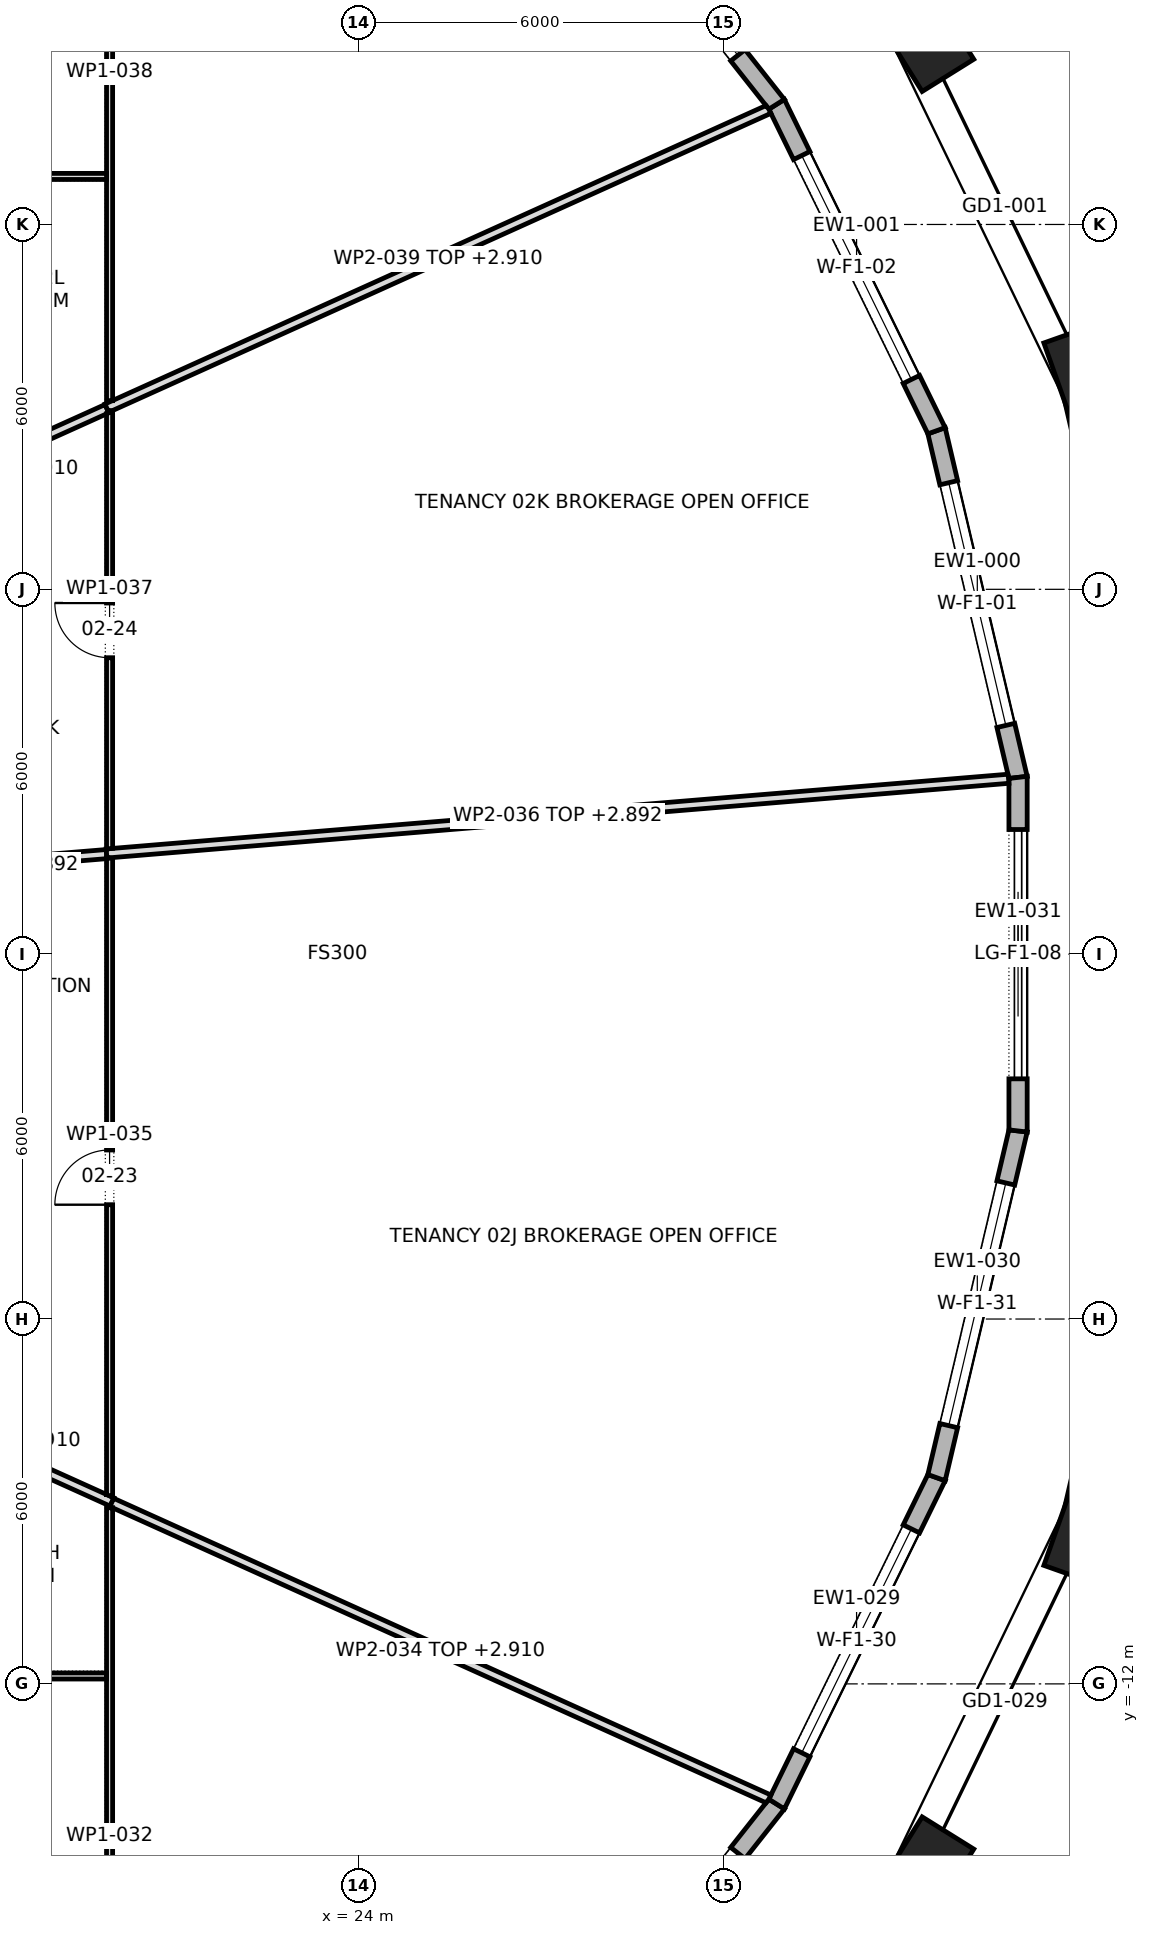
"""IFC4 building model, lengths in metres.
Left out: names, types, materials, properties, quantities, classifications, styles, units other than length and angle.
Written with IfcOpenShell. Run it as: python <this file> out.ifc"""

import sys

from ifc_helpers import new_model, si_unit, direction, frame, frame_2d, origin, origin_2d, place, context, subcontext, project, spatial, polyline, rectangle, outline, extrude, element, fill, save


model = new_model("IFC4")
c1 = context("Model", 3, precision=1e-05, world=origin(), true_north=direction((0.0, 1.0)))
c2 = subcontext(c1, "Body", "Model", "MODEL_VIEW")
j1 = project(units=[si_unit("LENGTHUNIT", "METRE"), si_unit("PLANEANGLEUNIT", "RADIAN")], contexts=[c1])
p1 = place(None, origin())
s1 = spatial("IfcSite", under=j1, at=p1, CompositionType="ELEMENT")
p2 = place(p1, origin())
s2 = spatial("IfcBuilding", under=s1, at=p2, CompositionType="ELEMENT")
p3 = place(p2, frame((0.0, 0.0, 36.1)))
s3 = spatial("IfcBuildingStorey", under=s2, at=p3, CompositionType="ELEMENT", Elevation=36.1)
for number, where, z_axis, x_axis in (
    (1, (36.036, 9.37, 0.0), (0.0, 0.0, 1.0), (-0.334, 0.943, 0.0)),
    (2, (33.211, 15.216, 0.0), (0.0, 0.0, 1.0), (-0.529, 0.849, 0.0)),
    (3, (33.211, -15.216, 0.0), (0.0, 0.0, 1.0), (0.529, 0.849, 0.0)),
    (4, (36.036, -9.37, 0.0), (0.0, 0.0, 1.0), (0.334, 0.943, 0.0)),
):
    element("IfcColumn", number, at=place(p3, frame(where, z_axis=z_axis, x_axis=x_axis)), inside=s3, PredefinedType="COLUMN", context=c2, shape_type="SweptSolid", body=[
        extrude(rectangle(XDim=1.8, YDim=1.0, at=origin_2d()), origin(), (0.0, 0.0, 1.0), 4.2),
    ])
p4 = place(p3, frame((34.84, 2.907, 0.0), z_axis=(0.0, 0.0, 1.0), x_axis=(-0.228976600496, 0.97343192696, 0.0)))
e5 = element("IfcWall", 5, at=p4, inside=s3, PredefinedType="STANDARD", context=c2, shape_type="SweptSolid", body=[
    extrude(outline(polyline([(-0.017, -0.15), (5.874, -0.15), (5.84, 0.15), (0.017, 0.15), (-0.017, -0.15)])), origin(), (0.0, 0.0, 1.0), 3.9),
])
p5 = place(p4, frame((0.878, 0.0, 0.6)))
e6 = element("IfcOpeningElement", 6, at=p5, cuts=e5, PredefinedType="OPENING", context=c2, shape_type="SweptSolid", body=[
    extrude(rectangle(XDim=4.1, YDim=2.85, at=frame_2d((2.05, 1.425))), frame((0.0, 0.162, 0.0), z_axis=(0.0, -1.0, 0.0), x_axis=(1.0, 0.0, 0.0)), (0.0, 0.0, 1.0), 0.324),
])
p6 = place(p3, frame((33.499, 8.608, 0.0), z_axis=(0.0, 0.0, 1.0), x_axis=(-0.439896354052, 0.898048549741, 0.0)))
e7 = element("IfcWall", 7, at=p6, inside=s3, PredefinedType="STANDARD", context=c2, shape_type="SweptSolid", body=[
    extrude(outline(polyline([(-0.017, -0.15), (5.994, -0.15), (5.962, 0.15), (0.017, 0.15), (-0.017, -0.15)])), origin(), (0.0, 0.0, 1.0), 3.9),
])
p7 = place(p6, frame((0.939, 0.0, 0.6)))
e8 = element("IfcOpeningElement", 8, at=p7, cuts=e7, PredefinedType="OPENING", context=c2, shape_type="SweptSolid", body=[
    extrude(rectangle(XDim=4.1, YDim=2.85, at=frame_2d((2.05, 1.425))), frame((0.0, 0.162, 0.0), z_axis=(0.0, -1.0, 0.0), x_axis=(1.0, 0.0, 0.0)), (0.0, 0.0, 1.0), 0.324),
])
p8 = place(p3, frame((30.869, 13.976, 0.0), z_axis=(0.0, 0.0, 1.0), x_axis=(-0.61992334328, 0.784662378642, 0.0)))
e9 = element("IfcWall", 9, at=p8, inside=s3, PredefinedType="STANDARD", context=c2, shape_type="SweptSolid", body=[
    extrude(outline(polyline([(-0.016, -0.15), (6.17, -0.15), (6.14, 0.15), (0.016, 0.15), (-0.016, -0.15)])), origin(), (0.0, 0.0, 1.0), 3.9),
])
p9 = place(p8, frame((1.027, 0.0, 0.6)))
e10 = element("IfcOpeningElement", 10, at=p9, cuts=e9, PredefinedType="OPENING", context=c2, shape_type="SweptSolid", body=[
    extrude(rectangle(XDim=4.1, YDim=2.85, at=frame_2d((2.05, 1.425))), frame((0.0, 0.162, 0.0), z_axis=(0.0, -1.0, 0.0), x_axis=(1.0, 0.0, 0.0)), (0.0, 0.0, 1.0), 0.324),
])
p10 = place(p3, frame((27.054, -18.806, 0.0), z_axis=(0.0, 0.0, 1.0), x_axis=(0.61992334328, 0.784662378642, 0.0)))
e11 = element("IfcWall", 11, at=p10, inside=s3, PredefinedType="STANDARD", context=c2, shape_type="SweptSolid", body=[
    extrude(outline(polyline([(-0.015, -0.15), (6.171, -0.15), (6.139, 0.15), (0.015, 0.15), (-0.015, -0.15)])), origin(), (0.0, 0.0, 1.0), 3.9),
])
p11 = place(p10, frame((1.027, 0.0, 0.6)))
e12 = element("IfcOpeningElement", 12, at=p11, cuts=e11, PredefinedType="OPENING", context=c2, shape_type="SweptSolid", body=[
    extrude(rectangle(XDim=4.1, YDim=2.85, at=frame_2d((2.05, 1.425))), frame((0.0, 0.162, 0.0), z_axis=(0.0, -1.0, 0.0), x_axis=(1.0, 0.0, 0.0)), (0.0, 0.0, 1.0), 0.324),
])
p12 = place(p3, frame((30.869, -13.976, 0.0), z_axis=(0.0, 0.0, 1.0), x_axis=(0.439896354052, 0.898048549741, 0.0)))
e13 = element("IfcWall", 13, at=p12, inside=s3, PredefinedType="STANDARD", context=c2, shape_type="SweptSolid", body=[
    extrude(outline(polyline([(-0.016, -0.15), (5.995, -0.15), (5.961, 0.15), (0.016, 0.15), (-0.016, -0.15)])), origin(), (0.0, 0.0, 1.0), 3.9),
])
p13 = place(p12, frame((0.939, 0.0, 0.6)))
e14 = element("IfcOpeningElement", 14, at=p13, cuts=e13, PredefinedType="OPENING", context=c2, shape_type="SweptSolid", body=[
    extrude(rectangle(XDim=4.1, YDim=2.85, at=frame_2d((2.05, 1.425))), frame((0.0, 0.162, 0.0), z_axis=(0.0, -1.0, 0.0), x_axis=(1.0, 0.0, 0.0)), (0.0, 0.0, 1.0), 0.324),
])
p14 = place(p3, frame((33.499, -8.608, 0.0), z_axis=(0.0, 0.0, 1.0), x_axis=(0.228976600496, 0.97343192696, 0.0)))
e15 = element("IfcWall", 15, at=p14, inside=s3, PredefinedType="STANDARD", context=c2, shape_type="SweptSolid", body=[
    extrude(outline(polyline([(-0.017, -0.15), (5.874, -0.15), (5.839, 0.15), (0.017, 0.15), (-0.017, -0.15)])), origin(), (0.0, 0.0, 1.0), 3.9),
])
p15 = place(p14, frame((0.878, 0.0, 0.6)))
e16 = element("IfcOpeningElement", 16, at=p15, cuts=e15, PredefinedType="OPENING", context=c2, shape_type="SweptSolid", body=[
    extrude(rectangle(XDim=4.1, YDim=2.85, at=frame_2d((2.05, 1.425))), frame((0.0, 0.162, 0.0), z_axis=(0.0, -1.0, 0.0), x_axis=(1.0, 0.0, 0.0)), (0.0, 0.0, 1.0), 0.324),
])
p16 = place(p3, frame((34.84, -2.907, 0.0), z_axis=(0.0, 0.0, 1.0), x_axis=(0.0, 1.0, 0.0)))
e17 = element("IfcWall", 17, at=p16, inside=s3, PredefinedType="STANDARD", context=c2, shape_type="SweptSolid", body=[
    extrude(outline(polyline([(-0.017, -0.15), (5.831, -0.15), (5.796, 0.15), (0.017, 0.15), (-0.017, -0.15)])), origin(), (0.0, 0.0, 1.0), 3.9),
])
p17 = place(p16, frame((0.857, 0.0, 0.0)))
e18 = element("IfcOpeningElement", 18, at=p17, cuts=e17, PredefinedType="OPENING", context=c2, shape_type="SweptSolid", body=[
    extrude(rectangle(XDim=4.1, YDim=3.45, at=frame_2d((2.05, 1.725))), frame((0.0, 0.162, 0.0), z_axis=(0.0, -1.0, 0.0), x_axis=(1.0, 0.0, 0.0)), (0.0, 0.0, 1.0), 0.324),
])
p18 = place(p3, frame((15.444, -6.98, 0.0), z_axis=(0.0, 0.0, 1.0), x_axis=(0.911554382715, -0.411179531778, 0.0)))
e19 = element("IfcWall", 19, at=p18, inside=s3, PredefinedType="PARTITIONING", context=c2, shape_type="SweptSolid", body=[
    extrude(outline(polyline([(0.051, -0.075), (1.678, -0.075), (3.305, -0.075), (4.932, -0.075), (4.932, -0.054), (4.932, 0.075), (4.805, 0.075), (4.801, 0.073), (4.8, 0.075), (3.2, 0.075), (1.6, 0.075), (0.0, 0.075), (0.02, 0.031), (0.006, 0.025), (0.051, -0.075)])), origin(), (0.0, 0.0, 1.0), 2.91),
])
p19 = place(p3, frame((15.469, 1.286, 0.0), z_axis=(0.0, 0.0, 1.0), x_axis=(0.996634800256, 0.081969963512, 0.0)))
e20 = element("IfcWall", 20, at=p19, inside=s3, PredefinedType="PARTITIONING", context=c2, shape_type="SweptSolid", body=[
    extrude(outline(polyline([(0.0, -0.075), (1.463, -0.075), (2.926, -0.075), (4.389, -0.075), (4.389, -0.075), (4.393, -0.075), (4.396, -0.075), (4.396, 0.075), (2.935, 0.075), (1.473, 0.075), (0.012, 0.075), (0.0, -0.07), (0.0, -0.075)])), origin(), (0.0, 0.0, 1.0), 2.892),
])
p20 = place(p3, frame((15.444, 6.98, 0.0), z_axis=(0.0, 0.0, 1.0), x_axis=(0.911543776443, 0.411203044285, 0.0)))
e21 = element("IfcWall", 21, at=p20, inside=s3, PredefinedType="PARTITIONING", context=c2, shape_type="SweptSolid", body=[
    extrude(outline(polyline([(0.0, -0.075), (1.6, -0.075), (3.2, -0.075), (4.8, -0.075), (4.8, -0.074), (4.802, -0.075), (4.842, -0.075), (4.842, 0.075), (3.251, 0.075), (1.659, 0.075), (0.068, 0.075), (0.0, -0.075)])), origin(), (0.0, 0.0, 1.0), 2.91),
])
p21 = place(p3, frame((19.9, -19.95, 0.0), z_axis=(0.0, 0.0, 1.0), x_axis=(0.0, 1.0, 0.0)))
e22 = element("IfcWall", 22, at=p21, inside=s3, PredefinedType="PARTITIONING", context=c2, shape_type="SweptSolid", body=[
    extrude(outline(polyline([(10.846, 0.05), (9.055, 0.05), (7.264, 0.05), (5.473, 0.05), (3.682, 0.05), (1.891, 0.05), (0.1, 0.05), (0.0, -0.05), (1.808, -0.05), (3.615, -0.05), (5.423, -0.05), (7.231, -0.05), (9.039, -0.05), (10.846, -0.05), (10.846, 0.05)])), origin(), (0.0, 0.0, 1.0), 3.9),
])
p22 = place(p21, frame((3.615, 0.0, 0.0)))
e23 = element("IfcOpeningElement", 23, at=p22, cuts=e22, PredefinedType="OPENING", context=c2, shape_type="SweptSolid", body=[
    extrude(rectangle(XDim=0.9, YDim=2.1, at=frame_2d((0.45, 1.05))), frame((0.0, 0.062, 0.0), z_axis=(0.0, -1.0, 0.0), x_axis=(1.0, 0.0, 0.0)), (0.0, 0.0, 1.0), 0.124),
])
p23 = place(p3, frame((19.85, -11.87, 0.0), z_axis=(0.0, 0.0, 1.0), x_axis=(-1.0, 0.0, 0.0)))
e24 = element("IfcWall", 24, at=p23, inside=s3, PredefinedType="PARTITIONING", context=c2, shape_type="SweptSolid", body=[
    extrude(outline(polyline([(4.39, -0.05), (4.39, 0.0), (4.375, 0.0), (4.375, 0.05), (2.917, 0.05), (1.458, 0.05), (0.0, 0.05), (0.0, -0.05), (1.463, -0.05), (2.927, -0.05), (4.39, -0.05)])), origin(), (0.0, 0.0, 1.0), 3.9),
])
p24 = place(p3, frame((19.937, -9.017, 0.0), z_axis=(0.0, 0.0, 1.0), x_axis=(0.911435859514, -0.411442187909, 0.0)))
e25 = element("IfcWall", 25, at=p24, inside=s3, PredefinedType="PARTITIONING", context=c2, shape_type="SweptSolid", body=[
    extrude(outline(polyline([(0.0, -0.075), (0.045, -0.075), (0.048, -0.074), (0.049, -0.075), (2.013, -0.075), (3.978, -0.075), (5.943, -0.075), (7.908, -0.075), (9.873, -0.075), (11.838, -0.075), (11.856, -0.001), (11.858, 0.069), (11.858, 0.075), (9.882, 0.075), (7.906, 0.075), (5.929, 0.075), (3.953, 0.075), (1.976, 0.075), (0.0, 0.075), (0.0, -0.075)])), origin(), (0.0, 0.0, 1.0), 2.91),
])
p25 = place(p3, frame((19.9, 1.588, 0.0), z_axis=(0.0, 0.0, 1.0), x_axis=(0.0, -1.0, 0.0)))
e26 = element("IfcWall", 26, at=p25, inside=s3, PredefinedType="PARTITIONING", context=c2, shape_type="SweptSolid", body=[
    extrude(outline(polyline([(0.018, -0.05), (1.76, -0.05), (3.503, -0.05), (5.246, -0.05), (6.988, -0.05), (8.731, -0.05), (10.473, -0.05), (10.518, 0.049), (10.518, 0.05), (8.765, 0.05), (7.012, 0.05), (5.259, 0.05), (3.506, 0.05), (1.753, 0.05), (0.0, 0.05), (0.0, 0.044), (0.007, -0.043), (0.0, -0.044), (0.0, -0.044), (0.017, -0.043), (0.018, -0.05)])), origin(), (0.0, 0.0, 1.0), 3.9),
])
p26 = place(p25, frame((4.809, 0.0, 0.0)))
e27 = element("IfcOpeningElement", 27, at=p26, cuts=e26, PredefinedType="OPENING", context=c2, shape_type="SweptSolid", body=[
    extrude(rectangle(XDim=0.9, YDim=2.1, at=frame_2d((0.45, 1.05))), frame((0.0, 0.062, 0.0), z_axis=(0.0, -1.0, 0.0), x_axis=(1.0, 0.0, 0.0)), (0.0, 0.0, 1.0), 0.124),
])
p27 = place(p3, frame((19.85, 1.656, 0.0), z_axis=(0.0, 0.0, 1.0), x_axis=(0.996587936268, 0.082537780956, 0.0)))
e28 = element("IfcWall", 28, at=p27, inside=s3, PredefinedType="PARTITIONING", context=c2, shape_type="SweptSolid", body=[
    extrude(outline(polyline([(14.884, -0.075), (14.884, 0.05), (14.881, 0.075), (13.021, 0.075), (11.16, 0.075), (9.3, 0.075), (7.44, 0.075), (5.58, 0.075), (3.72, 0.075), (1.86, 0.075), (0.0, 0.075), (0.0, -0.068), (0.087, -0.075), (1.937, -0.075), (3.786, -0.075), (5.636, -0.075), (7.486, -0.075), (9.335, -0.075), (11.185, -0.075), (13.035, -0.075), (14.884, -0.075)])), origin(), (0.0, 0.0, 1.0), 2.892),
])
p28 = place(p3, frame((19.9, 8.94, 0.0), z_axis=(0.0, 0.0, 1.0), x_axis=(0.0, -1.0, 0.0)))
e29 = element("IfcWall", 29, at=p28, inside=s3, PredefinedType="PARTITIONING", context=c2, shape_type="SweptSolid", body=[
    extrude(outline(polyline([(7.208, -0.05), (7.208, -0.046), (7.201, 0.05), (5.4, 0.05), (3.6, 0.05), (1.8, 0.05), (0.0, 0.05), (0.0, 0.049), (0.029, -0.015), (0.0, -0.028), (0.0, -0.028), (0.037, -0.011), (0.055, -0.05), (1.843, -0.05), (3.632, -0.05), (5.42, -0.05), (7.208, -0.05)])), origin(), (0.0, 0.0, 1.0), 3.9),
])
p29 = place(p28, frame((3.165, 0.0, 0.0)))
e30 = element("IfcOpeningElement", 30, at=p29, cuts=e29, PredefinedType="OPENING", context=c2, shape_type="SweptSolid", body=[
    extrude(rectangle(XDim=0.9, YDim=2.1, at=frame_2d((0.45, 1.05))), frame((0.0, 0.062, 0.0), z_axis=(0.0, -1.0, 0.0), x_axis=(1.0, 0.0, 0.0)), (0.0, 0.0, 1.0), 0.124),
])
p30 = place(p3, frame((19.9, 9.103, 0.0), z_axis=(0.0, 0.0, 1.0), x_axis=(0.0, 1.0, 0.0)))
e31 = element("IfcWall", 31, at=p30, inside=s3, PredefinedType="PARTITIONING", context=c2, shape_type="SweptSolid", body=[
    extrude(outline(polyline([(0.0, -0.05), (1.808, -0.05), (3.616, -0.05), (5.424, -0.05), (7.232, -0.05), (9.04, -0.05), (10.847, -0.05), (10.747, 0.05), (8.956, 0.05), (7.165, 0.05), (5.374, 0.05), (3.583, 0.05), (1.791, 0.05), (0.0, 0.05), (0.0, -0.05)])), origin(), (0.0, 0.0, 1.0), 3.9),
])
p31 = place(p3, frame((19.854, 8.979, 0.0), z_axis=(0.0, 0.0, 1.0), x_axis=(0.911433390516, 0.411447657245, 0.0)))
e32 = element("IfcWall", 32, at=p31, inside=s3, PredefinedType="PARTITIONING", context=c2, shape_type="SweptSolid", body=[
    extrude(outline(polyline([(11.948, -0.075), (11.948, -0.063), (11.946, 0.001), (11.927, 0.075), (9.963, 0.075), (7.998, 0.075), (6.033, 0.075), (4.068, 0.075), (2.104, 0.075), (0.139, 0.075), (0.138, 0.073), (0.133, 0.075), (0.0, 0.075), (0.0, -0.043), (0.07, -0.075), (2.05, -0.075), (4.029, -0.075), (6.009, -0.075), (7.989, -0.075), (9.968, -0.075), (11.948, -0.075)])), origin(), (0.0, 0.0, 1.0), 2.91),
])
p32 = place(p3, frame((19.85, 12.79, 0.0), z_axis=(0.0, 0.0, 1.0), x_axis=(-1.0, 0.0, 0.0)))
e33 = element("IfcWall", 33, at=p32, inside=s3, PredefinedType="PARTITIONING", context=c2, shape_type="SweptSolid", body=[
    extrude(rectangle(XDim=4.375, YDim=0.1, at=frame_2d((2.188, 0.0))), origin(), (0.0, 0.0, 1.0), 3.9),
])
p33 = place(p5, origin())
e34 = element("IfcWindow", 34, at=p33, inside=s3, PartitioningType="TRIPLE_PANEL_VERTICAL", PredefinedType="WINDOW", context=c2, shape_type="SweptSolid", body=[
    extrude(rectangle(XDim=4.1, YDim=2.85, at=frame_2d((2.05, 1.425))), frame((0.0, 0.03, 0.0), z_axis=(0.0, -1.0, 0.0), x_axis=(1.0, 0.0, 0.0)), (0.0, 0.0, 1.0), 0.06),
])
fill(e6, e34)
p34 = place(p7, origin())
e35 = element("IfcWindow", 35, at=p34, inside=s3, PartitioningType="TRIPLE_PANEL_VERTICAL", PredefinedType="WINDOW", context=c2, shape_type="SweptSolid", body=[
    extrude(rectangle(XDim=4.1, YDim=2.85, at=frame_2d((2.05, 1.425))), frame((0.0, 0.03, 0.0), z_axis=(0.0, -1.0, 0.0), x_axis=(1.0, 0.0, 0.0)), (0.0, 0.0, 1.0), 0.06),
])
fill(e8, e35)
p35 = place(p9, origin())
e36 = element("IfcWindow", 36, at=p35, inside=s3, PartitioningType="TRIPLE_PANEL_VERTICAL", PredefinedType="WINDOW", context=c2, shape_type="SweptSolid", body=[
    extrude(rectangle(XDim=4.1, YDim=2.85, at=frame_2d((2.05, 1.425))), frame((0.0, 0.03, 0.0), z_axis=(0.0, -1.0, 0.0), x_axis=(1.0, 0.0, 0.0)), (0.0, 0.0, 1.0), 0.06),
])
fill(e10, e36)
p36 = place(p11, origin())
e37 = element("IfcWindow", 37, at=p36, inside=s3, PartitioningType="TRIPLE_PANEL_VERTICAL", PredefinedType="WINDOW", context=c2, shape_type="SweptSolid", body=[
    extrude(rectangle(XDim=4.1, YDim=2.85, at=frame_2d((2.05, 1.425))), frame((0.0, 0.03, 0.0), z_axis=(0.0, -1.0, 0.0), x_axis=(1.0, 0.0, 0.0)), (0.0, 0.0, 1.0), 0.06),
])
fill(e12, e37)
p37 = place(p13, origin())
e38 = element("IfcWindow", 38, at=p37, inside=s3, PartitioningType="TRIPLE_PANEL_VERTICAL", PredefinedType="WINDOW", context=c2, shape_type="SweptSolid", body=[
    extrude(rectangle(XDim=4.1, YDim=2.85, at=frame_2d((2.05, 1.425))), frame((0.0, 0.03, 0.0), z_axis=(0.0, -1.0, 0.0), x_axis=(1.0, 0.0, 0.0)), (0.0, 0.0, 1.0), 0.06),
])
fill(e14, e38)
p38 = place(p15, origin())
e39 = element("IfcWindow", 39, at=p38, inside=s3, PartitioningType="TRIPLE_PANEL_VERTICAL", PredefinedType="WINDOW", context=c2, shape_type="SweptSolid", body=[
    extrude(rectangle(XDim=4.1, YDim=2.85, at=frame_2d((2.05, 1.425))), frame((0.0, 0.03, 0.0), z_axis=(0.0, -1.0, 0.0), x_axis=(1.0, 0.0, 0.0)), (0.0, 0.0, 1.0), 0.06),
])
fill(e16, e39)
p39 = place(p17, origin())
e40 = element("IfcDoor", 40, at=p39, inside=s3, OperationType="DOUBLE_DOOR_SLIDING", PredefinedType="DOOR", context=c2, shape_type="SweptSolid", body=[
    extrude(rectangle(XDim=4.1, YDim=3.45, at=frame_2d((2.05, 1.725))), frame((0.0, 0.025, 0.0), z_axis=(0.0, -1.0, 0.0), x_axis=(1.0, 0.0, 0.0)), (0.0, 0.0, 1.0), 0.05),
])
fill(e18, e40)
p40 = place(p26, frame((0.9, 0.0, 0.0), z_axis=(0.0, 0.0, 1.0), x_axis=(-1.0, 0.0, 0.0)))
e41 = element("IfcDoor", 41, at=p40, inside=s3, OperationType="SINGLE_SWING_RIGHT", PredefinedType="DOOR", context=c2, shape_type="SweptSolid", body=[
    extrude(rectangle(XDim=0.9, YDim=2.1, at=frame_2d((0.45, 1.05))), frame((0.0, 0.025, 0.0), z_axis=(0.0, -1.0, 0.0), x_axis=(1.0, 0.0, 0.0)), (0.0, 0.0, 1.0), 0.05),
])
fill(e27, e41)
p41 = place(p29, frame((0.9, 0.0, 0.0), z_axis=(0.0, 0.0, 1.0), x_axis=(-1.0, 0.0, 0.0)))
e42 = element("IfcDoor", 42, at=p41, inside=s3, OperationType="SINGLE_SWING_LEFT", PredefinedType="DOOR", context=c2, shape_type="SweptSolid", body=[
    extrude(rectangle(XDim=0.9, YDim=2.1, at=frame_2d((0.45, 1.05))), frame((0.0, 0.025, 0.0), z_axis=(0.0, -1.0, 0.0), x_axis=(1.0, 0.0, 0.0)), (0.0, 0.0, 1.0), 0.05),
])
fill(e30, e42)
save(model, sys.argv[1])
